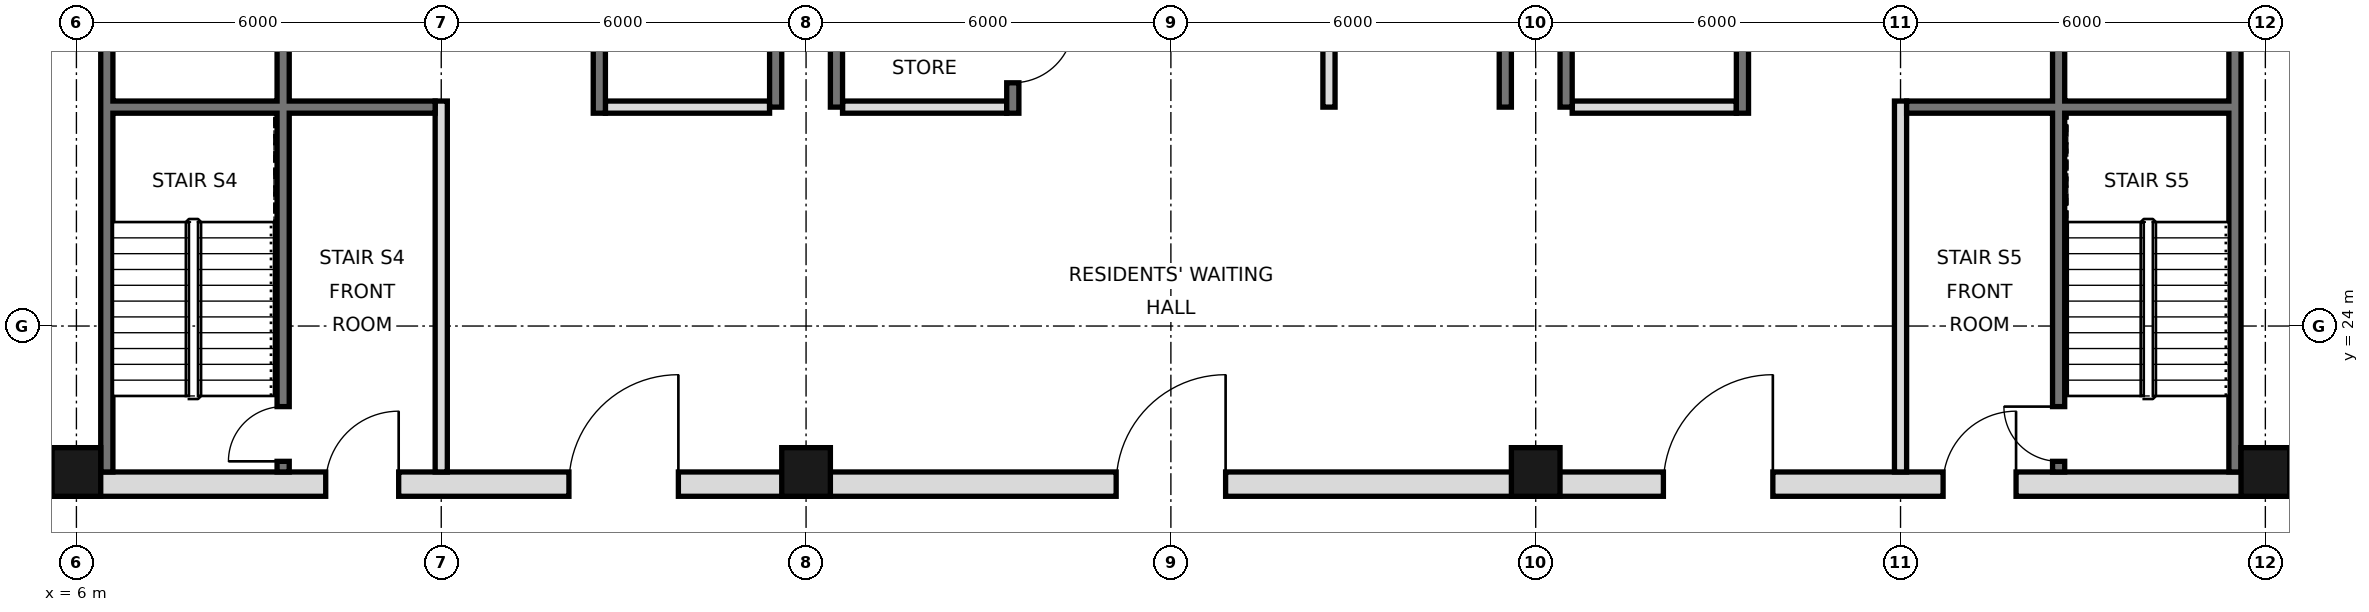
"""IFC4 building model, lengths in metres.
Left out: names, types, materials, properties, quantities, classifications, styles, units other than length and angle.
Written with IfcOpenShell. Run it as: python <this file> out.ifc"""

import sys

from ifc_helpers import new_model, si_unit, direction, frame, frame_2d, origin, origin_2d, place, context, subcontext, project, spatial, rectangle, hollow_rectangle, extrude, element, fill, save


model = new_model("IFC4")
c1 = context("Model", 3, precision=1e-05, world=origin(), true_north=direction((0.0, 1.0)))
c2 = subcontext(c1, "Body", "Model", "MODEL_VIEW")
j1 = project(units=[si_unit("LENGTHUNIT", "METRE"), si_unit("PLANEANGLEUNIT", "RADIAN")], contexts=[c1])
p1 = place(None, origin())
s1 = spatial("IfcSite", under=j1, at=p1, CompositionType="ELEMENT")
p2 = place(p1, origin())
s2 = spatial("IfcBuilding", under=s1, at=p2, CompositionType="ELEMENT")
p3 = place(p2, frame((0.0, 0.0, 337.8)))
s3 = spatial("IfcBuildingStorey", under=s2, at=p3, CompositionType="ELEMENT", Elevation=337.8)
for number, where, z_axis, x_axis in (
    (1, (6.0, 21.6, 0.0), (0.0, 0.0, 1.0), (1.0, 0.0, 0.0)),
    (2, (18.0, 21.6, 0.0), (0.0, 0.0, 1.0), (1.0, 0.0, 0.0)),
    (3, (30.0, 21.6, 0.0), (0.0, 0.0, 1.0), (1.0, 0.0, 0.0)),
    (4, (42.0, 21.6, 0.0), (0.0, 0.0, 1.0), (1.0, 0.0, 0.0)),
):
    element("IfcColumn", number, at=place(p3, frame(where, z_axis=z_axis, x_axis=x_axis)), inside=s3, PredefinedType="COLUMN", context=c2, shape_type="SweptSolid", body=[
        extrude(hollow_rectangle(XDim=0.8, YDim=0.8, WallThickness=0.025, at=origin_2d()), origin(), (0.0, 0.0, 1.0), 4.0),
    ])
for number, where, z_axis, x_axis in (
    (5, (6.5, 21.6, 0.0), (0.0, 0.0, 1.0), (0.0, 1.0, 0.0)),
    (6, (41.5, 21.6, 0.0), (0.0, 0.0, 1.0), (0.0, 1.0, 0.0)),
):
    element("IfcWall", number, at=place(p3, frame(where, z_axis=z_axis, x_axis=x_axis)), inside=s3, PredefinedType="SOLIDWALL", context=c2, shape_type="SweptSolid", body=[
        extrude(rectangle(XDim=23.5, YDim=0.2, at=frame_2d((11.75, 0.0))), origin(), (0.0, 0.0, 1.0), 3.75),
    ])
for number, where, z_axis, x_axis in (
    (7, (17.5, 27.6, 0.0), (0.0, 0.0, 1.0), (0.0, 1.0, 0.0)),
    (8, (18.5, 27.6, 0.0), (0.0, 0.0, 1.0), (0.0, 1.0, 0.0)),
    (9, (29.5, 27.6, 0.0), (0.0, 0.0, 1.0), (0.0, 1.0, 0.0)),
    (10, (30.5, 27.6, 0.0), (0.0, 0.0, 1.0), (0.0, 1.0, 0.0)),
):
    element("IfcWall", number, at=place(p3, frame(where, z_axis=z_axis, x_axis=x_axis)), inside=s3, PredefinedType="SOLIDWALL", context=c2, shape_type="SweptSolid", body=[
        extrude(rectangle(XDim=17.5, YDim=0.2, at=frame_2d((8.75, 0.0))), origin(), (0.0, 0.0, 1.0), 3.75),
    ])
p4 = place(p3, frame((5.6, 21.4, 0.0), z_axis=(0.0, 0.0, 1.0), x_axis=(1.0, 0.0, 0.0)))
e11 = element("IfcWall", 11, at=p4, inside=s3, PredefinedType="SOLIDWALL", context=c2, shape_type="SweptSolid", body=[
    extrude(rectangle(XDim=36.8, YDim=0.4, at=frame_2d((18.4, 0.0))), origin(), (0.0, 0.0, 1.0), 3.75),
])
p5 = place(p4, frame((8.5, 0.0, 0.0)))
e12 = element("IfcOpeningElement", 12, at=p5, cuts=e11, PredefinedType="OPENING", context=c2, shape_type="SweptSolid", body=[
    extrude(rectangle(XDim=1.8, YDim=2.1, at=frame_2d((0.9, 1.05))), frame((0.0, 0.21, 0.0), z_axis=(0.0, -1.0, 0.0), x_axis=(1.0, 0.0, 0.0)), (0.0, 0.0, 1.0), 0.42),
])
p6 = place(p4, frame((17.5, 0.0, 0.0)))
e13 = element("IfcOpeningElement", 13, at=p6, cuts=e11, PredefinedType="OPENING", context=c2, shape_type="SweptSolid", body=[
    extrude(rectangle(XDim=1.8, YDim=2.1, at=frame_2d((0.9, 1.05))), frame((0.0, 0.21, 0.0), z_axis=(0.0, -1.0, 0.0), x_axis=(1.0, 0.0, 0.0)), (0.0, 0.0, 1.0), 0.42),
])
p7 = place(p4, frame((26.5, 0.0, 0.0)))
e14 = element("IfcOpeningElement", 14, at=p7, cuts=e11, PredefinedType="OPENING", context=c2, shape_type="SweptSolid", body=[
    extrude(rectangle(XDim=1.8, YDim=2.1, at=frame_2d((0.9, 1.05))), frame((0.0, 0.21, 0.0), z_axis=(0.0, -1.0, 0.0), x_axis=(1.0, 0.0, 0.0)), (0.0, 0.0, 1.0), 0.42),
])
p8 = place(p4, frame((4.5, 0.0, 0.0)))
e15 = element("IfcOpeningElement", 15, at=p8, cuts=e11, PredefinedType="OPENING", context=c2, shape_type="SweptSolid", body=[
    extrude(rectangle(XDim=1.2, YDim=2.1, at=frame_2d((0.6, 1.05))), frame((0.0, 0.21, 0.0), z_axis=(0.0, -1.0, 0.0), x_axis=(1.0, 0.0, 0.0)), (0.0, 0.0, 1.0), 0.42),
])
p9 = place(p4, frame((31.1, 0.0, 0.0)))
e16 = element("IfcOpeningElement", 16, at=p9, cuts=e11, PredefinedType="OPENING", context=c2, shape_type="SweptSolid", body=[
    extrude(rectangle(XDim=1.2, YDim=2.1, at=frame_2d((0.6, 1.05))), frame((0.0, 0.21, 0.0), z_axis=(0.0, -1.0, 0.0), x_axis=(1.0, 0.0, 0.0)), (0.0, 0.0, 1.0), 0.42),
])
p10 = place(p3, frame((12.0, 21.6, 0.0), z_axis=(0.0, 0.0, 1.0), x_axis=(0.0, 1.0, 0.0)))
e17 = element("IfcWall", 17, at=p10, inside=s3, PredefinedType="PARTITIONING", context=c2, shape_type="SweptSolid", body=[
    extrude(rectangle(XDim=6.1, YDim=0.2, at=frame_2d((3.05, 0.0))), origin(), (0.0, 0.0, 1.0), 3.75),
])
p11 = place(p3, frame((14.6, 27.5, 0.0), z_axis=(0.0, 0.0, 1.0), x_axis=(0.0, 1.0, 0.0)))
e18 = element("IfcWall", 18, at=p11, inside=s3, PredefinedType="SOLIDWALL", context=c2, shape_type="SweptSolid", body=[
    extrude(rectangle(XDim=17.5, YDim=0.2, at=frame_2d((8.75, 0.0))), origin(), (0.0, 0.0, 1.0), 3.75),
])
p12 = place(p11, frame((15.4, 0.0, 0.0)))
e19 = element("IfcOpeningElement", 19, at=p12, cuts=e18, PredefinedType="OPENING", context=c2, shape_type="SweptSolid", body=[
    extrude(rectangle(XDim=1.1, YDim=2.1, at=frame_2d((0.55, 1.05))), frame((0.0, 0.11, 0.0), z_axis=(0.0, -1.0, 0.0), x_axis=(1.0, 0.0, 0.0)), (0.0, 0.0, 1.0), 0.22),
])
p13 = place(p11, frame((1.15, 0.0, 0.0)))
e20 = element("IfcOpeningElement", 20, at=p13, cuts=e18, PredefinedType="OPENING", context=c2, shape_type="SweptSolid", body=[
    extrude(rectangle(XDim=1.0, YDim=2.1, at=frame_2d((0.5, 1.05))), frame((0.0, 0.11, 0.0), z_axis=(0.0, -1.0, 0.0), x_axis=(1.0, 0.0, 0.0)), (0.0, 0.0, 1.0), 0.22),
])
p14 = place(p11, frame((4.25, 0.0, 0.0)))
e21 = element("IfcOpeningElement", 21, at=p14, cuts=e18, PredefinedType="OPENING", context=c2, shape_type="SweptSolid", body=[
    extrude(rectangle(XDim=1.0, YDim=2.1, at=frame_2d((0.5, 1.05))), frame((0.0, 0.11, 0.0), z_axis=(0.0, -1.0, 0.0), x_axis=(1.0, 0.0, 0.0)), (0.0, 0.0, 1.0), 0.22),
])
p15 = place(p3, frame((21.4, 27.5, 0.0), z_axis=(0.0, 0.0, 1.0), x_axis=(0.0, 1.0, 0.0)))
e22 = element("IfcWall", 22, at=p15, inside=s3, PredefinedType="SOLIDWALL", context=c2, shape_type="SweptSolid", body=[
    extrude(rectangle(XDim=17.5, YDim=0.2, at=frame_2d((8.75, 0.0))), origin(), (0.0, 0.0, 1.0), 3.75),
])
p16 = place(p15, frame((0.5, 0.0, 0.0)))
e23 = element("IfcOpeningElement", 23, at=p16, cuts=e22, PredefinedType="OPENING", context=c2, shape_type="SweptSolid", body=[
    extrude(rectangle(XDim=1.0, YDim=2.1, at=frame_2d((0.5, 1.05))), frame((0.0, 0.11, 0.0), z_axis=(0.0, -1.0, 0.0), x_axis=(1.0, 0.0, 0.0)), (0.0, 0.0, 1.0), 0.22),
])
p17 = place(p15, frame((3.6, 0.0, 0.0)))
e24 = element("IfcOpeningElement", 24, at=p17, cuts=e22, PredefinedType="OPENING", context=c2, shape_type="SweptSolid", body=[
    extrude(rectangle(XDim=1.0, YDim=2.1, at=frame_2d((0.5, 1.05))), frame((0.0, 0.11, 0.0), z_axis=(0.0, -1.0, 0.0), x_axis=(1.0, 0.0, 0.0)), (0.0, 0.0, 1.0), 0.22),
])
p18 = place(p15, frame((9.8, 0.0, 0.0)))
e25 = element("IfcOpeningElement", 25, at=p18, cuts=e22, PredefinedType="OPENING", context=c2, shape_type="SweptSolid", body=[
    extrude(rectangle(XDim=1.0, YDim=2.1, at=frame_2d((0.5, 1.05))), frame((0.0, 0.11, 0.0), z_axis=(0.0, -1.0, 0.0), x_axis=(1.0, 0.0, 0.0)), (0.0, 0.0, 1.0), 0.22),
])
p19 = place(p3, frame((26.6, 27.6, 0.0), z_axis=(0.0, 0.0, 1.0), x_axis=(0.0, 1.0, 0.0)))
e26 = element("IfcWall", 26, at=p19, inside=s3, PredefinedType="PARTITIONING", context=c2, shape_type="SweptSolid", body=[
    extrude(rectangle(XDim=17.4, YDim=0.2, at=frame_2d((8.7, 0.0))), origin(), (0.0, 0.0, 1.0), 3.75),
])
p20 = place(p19, frame((10.25, 0.0, 0.0)))
e27 = element("IfcOpeningElement", 27, at=p20, cuts=e26, PredefinedType="OPENING", context=c2, shape_type="SweptSolid", body=[
    extrude(rectangle(XDim=1.0, YDim=2.1, at=frame_2d((0.5, 1.05))), frame((0.0, 0.11, 0.0), z_axis=(0.0, -1.0, 0.0), x_axis=(1.0, 0.0, 0.0)), (0.0, 0.0, 1.0), 0.22),
])
p21 = place(p3, frame((33.4, 27.5, 0.0), z_axis=(0.0, 0.0, 1.0), x_axis=(0.0, 1.0, 0.0)))
e28 = element("IfcWall", 28, at=p21, inside=s3, PredefinedType="SOLIDWALL", context=c2, shape_type="SweptSolid", body=[
    extrude(rectangle(XDim=17.5, YDim=0.2, at=frame_2d((8.75, 0.0))), origin(), (0.0, 0.0, 1.0), 3.75),
])
p22 = place(p21, frame((15.4, 0.0, 0.0)))
e29 = element("IfcOpeningElement", 29, at=p22, cuts=e28, PredefinedType="OPENING", context=c2, shape_type="SweptSolid", body=[
    extrude(rectangle(XDim=1.1, YDim=2.1, at=frame_2d((0.55, 1.05))), frame((0.0, 0.11, 0.0), z_axis=(0.0, -1.0, 0.0), x_axis=(1.0, 0.0, 0.0)), (0.0, 0.0, 1.0), 0.22),
])
p23 = place(p21, frame((1.15, 0.0, 0.0)))
e30 = element("IfcOpeningElement", 30, at=p23, cuts=e28, PredefinedType="OPENING", context=c2, shape_type="SweptSolid", body=[
    extrude(rectangle(XDim=1.0, YDim=2.1, at=frame_2d((0.5, 1.05))), frame((0.0, 0.11, 0.0), z_axis=(0.0, -1.0, 0.0), x_axis=(1.0, 0.0, 0.0)), (0.0, 0.0, 1.0), 0.22),
])
p24 = place(p21, frame((4.25, 0.0, 0.0)))
e31 = element("IfcOpeningElement", 31, at=p24, cuts=e28, PredefinedType="OPENING", context=c2, shape_type="SweptSolid", body=[
    extrude(rectangle(XDim=1.0, YDim=2.1, at=frame_2d((0.5, 1.05))), frame((0.0, 0.11, 0.0), z_axis=(0.0, -1.0, 0.0), x_axis=(1.0, 0.0, 0.0)), (0.0, 0.0, 1.0), 0.22),
])
p25 = place(p3, frame((36.0, 21.6, 0.0), z_axis=(0.0, 0.0, 1.0), x_axis=(0.0, 1.0, 0.0)))
e32 = element("IfcWall", 32, at=p25, inside=s3, PredefinedType="PARTITIONING", context=c2, shape_type="SweptSolid", body=[
    extrude(rectangle(XDim=6.1, YDim=0.2, at=frame_2d((3.05, 0.0))), origin(), (0.0, 0.0, 1.0), 3.75),
])
p26 = place(p3, frame((38.6, 21.6, 0.0), z_axis=(0.0, 0.0, 1.0), x_axis=(0.0, 1.0, 0.0)))
e33 = element("IfcWall", 33, at=p26, inside=s3, PredefinedType="SOLIDWALL", context=c2, shape_type="SweptSolid", body=[
    extrude(rectangle(XDim=23.4, YDim=0.2, at=frame_2d((11.7, 0.0))), origin(), (0.0, 0.0, 1.0), 3.75),
])
p27 = place(p26, frame((7.05, 0.0, 0.0)))
e34 = element("IfcOpeningElement", 34, at=p27, cuts=e33, PredefinedType="OPENING", context=c2, shape_type="SweptSolid", body=[
    extrude(rectangle(XDim=1.0, YDim=2.1, at=frame_2d((0.5, 1.05))), frame((0.0, 0.11, 0.0), z_axis=(0.0, -1.0, 0.0), x_axis=(1.0, 0.0, 0.0)), (0.0, 0.0, 1.0), 0.22),
])
p28 = place(p26, frame((11.7, 0.0, 0.0)))
e35 = element("IfcOpeningElement", 35, at=p28, cuts=e33, PredefinedType="OPENING", context=c2, shape_type="SweptSolid", body=[
    extrude(rectangle(XDim=1.0, YDim=2.1, at=frame_2d((0.5, 1.05))), frame((0.0, 0.11, 0.0), z_axis=(0.0, -1.0, 0.0), x_axis=(1.0, 0.0, 0.0)), (0.0, 0.0, 1.0), 0.22),
])
p29 = place(p26, frame((15.7, 0.0, 0.0)))
e36 = element("IfcOpeningElement", 36, at=p29, cuts=e33, PredefinedType="OPENING", context=c2, shape_type="SweptSolid", body=[
    extrude(rectangle(XDim=1.0, YDim=2.1, at=frame_2d((0.5, 1.05))), frame((0.0, 0.11, 0.0), z_axis=(0.0, -1.0, 0.0), x_axis=(1.0, 0.0, 0.0)), (0.0, 0.0, 1.0), 0.22),
])
p30 = place(p26, frame((0.175, 0.0, 0.0)))
e37 = element("IfcOpeningElement", 37, at=p30, cuts=e33, PredefinedType="OPENING", context=c2, shape_type="SweptSolid", body=[
    extrude(rectangle(XDim=0.9, YDim=2.1, at=frame_2d((0.45, 1.05))), frame((0.0, 0.11, 0.0), z_axis=(0.0, -1.0, 0.0), x_axis=(1.0, 0.0, 0.0)), (0.0, 0.0, 1.0), 0.22),
])
p31 = place(p3, frame((9.4, 21.6, 0.0), z_axis=(0.0, 0.0, 1.0), x_axis=(0.0, 1.0, 0.0)))
e38 = element("IfcWall", 38, at=p31, inside=s3, PredefinedType="SOLIDWALL", context=c2, shape_type="SweptSolid", body=[
    extrude(rectangle(XDim=23.4, YDim=0.2, at=frame_2d((11.7, 0.0))), origin(), (0.0, 0.0, 1.0), 3.75),
])
p32 = place(p31, frame((7.7, 0.0, 0.0)))
e39 = element("IfcOpeningElement", 39, at=p32, cuts=e38, PredefinedType="OPENING", context=c2, shape_type="SweptSolid", body=[
    extrude(rectangle(XDim=1.0, YDim=2.1, at=frame_2d((0.5, 1.05))), frame((0.0, 0.11, 0.0), z_axis=(0.0, -1.0, 0.0), x_axis=(1.0, 0.0, 0.0)), (0.0, 0.0, 1.0), 0.22),
])
p33 = place(p31, frame((12.35, 0.0, 0.0)))
e40 = element("IfcOpeningElement", 40, at=p33, cuts=e38, PredefinedType="OPENING", context=c2, shape_type="SweptSolid", body=[
    extrude(rectangle(XDim=1.0, YDim=2.1, at=frame_2d((0.5, 1.05))), frame((0.0, 0.11, 0.0), z_axis=(0.0, -1.0, 0.0), x_axis=(1.0, 0.0, 0.0)), (0.0, 0.0, 1.0), 0.22),
])
p34 = place(p31, frame((15.7, 0.0, 0.0)))
e41 = element("IfcOpeningElement", 41, at=p34, cuts=e38, PredefinedType="OPENING", context=c2, shape_type="SweptSolid", body=[
    extrude(rectangle(XDim=1.0, YDim=2.1, at=frame_2d((0.5, 1.05))), frame((0.0, 0.11, 0.0), z_axis=(0.0, -1.0, 0.0), x_axis=(1.0, 0.0, 0.0)), (0.0, 0.0, 1.0), 0.22),
])
p35 = place(p31, frame((0.175, 0.0, 0.0)))
e42 = element("IfcOpeningElement", 42, at=p35, cuts=e38, PredefinedType="OPENING", context=c2, shape_type="SweptSolid", body=[
    extrude(rectangle(XDim=0.9, YDim=2.1, at=frame_2d((0.45, 1.05))), frame((0.0, 0.11, 0.0), z_axis=(0.0, -1.0, 0.0), x_axis=(1.0, 0.0, 0.0)), (0.0, 0.0, 1.0), 0.22),
])
for number, where, z_axis, x_axis in (
    (43, (14.7, 27.6, 0.0), (0.0, 0.0, 1.0), (1.0, 0.0, 0.0)),
    (44, (18.6, 27.6, 0.0), (0.0, 0.0, 1.0), (1.0, 0.0, 0.0)),
    (45, (30.6, 27.6, 0.0), (0.0, 0.0, 1.0), (1.0, 0.0, 0.0)),
):
    element("IfcWall", number, at=place(p3, frame(where, z_axis=z_axis, x_axis=x_axis)), inside=s3, PredefinedType="PARTITIONING", context=c2, shape_type="SweptSolid", body=[
        extrude(rectangle(XDim=2.7, YDim=0.2, at=frame_2d((1.35, 0.0))), origin(), (0.0, 0.0, 1.0), 3.75),
    ])
for number, where, z_axis, x_axis in (
    (46, (36.1, 27.6, 0.0), (0.0, 0.0, 1.0), (1.0, 0.0, 0.0)),
    (47, (6.6, 27.6, 0.0), (0.0, 0.0, 1.0), (1.0, 0.0, 0.0)),
):
    element("IfcWall", number, at=place(p3, frame(where, z_axis=z_axis, x_axis=x_axis)), inside=s3, PredefinedType="SOLIDWALL", context=c2, shape_type="SweptSolid", body=[
        extrude(rectangle(XDim=5.3, YDim=0.2, at=frame_2d((2.65, 0.0))), origin(), (0.0, 0.0, 1.0), 3.75),
    ])
p36 = place(p5, frame((1.8, 0.0, 0.0), z_axis=(0.0, 0.0, 1.0), x_axis=(-1.0, 0.0, 0.0)))
e48 = element("IfcDoor", 48, at=p36, inside=s3, OperationType="SINGLE_SWING_LEFT", PredefinedType="DOOR", context=c2, shape_type="SweptSolid", body=[
    extrude(rectangle(XDim=1.8, YDim=2.1, at=frame_2d((0.9, 1.05))), frame((0.0, 0.025, 0.0), z_axis=(0.0, -1.0, 0.0), x_axis=(1.0, 0.0, 0.0)), (0.0, 0.0, 1.0), 0.05),
])
fill(e12, e48)
p37 = place(p6, frame((1.8, 0.0, 0.0), z_axis=(0.0, 0.0, 1.0), x_axis=(-1.0, 0.0, 0.0)))
e49 = element("IfcDoor", 49, at=p37, inside=s3, OperationType="SINGLE_SWING_LEFT", PredefinedType="DOOR", context=c2, shape_type="SweptSolid", body=[
    extrude(rectangle(XDim=1.8, YDim=2.1, at=frame_2d((0.9, 1.05))), frame((0.0, 0.025, 0.0), z_axis=(0.0, -1.0, 0.0), x_axis=(1.0, 0.0, 0.0)), (0.0, 0.0, 1.0), 0.05),
])
fill(e13, e49)
p38 = place(p7, frame((1.8, 0.0, 0.0), z_axis=(0.0, 0.0, 1.0), x_axis=(-1.0, 0.0, 0.0)))
e50 = element("IfcDoor", 50, at=p38, inside=s3, OperationType="SINGLE_SWING_LEFT", PredefinedType="DOOR", context=c2, shape_type="SweptSolid", body=[
    extrude(rectangle(XDim=1.8, YDim=2.1, at=frame_2d((0.9, 1.05))), frame((0.0, 0.025, 0.0), z_axis=(0.0, -1.0, 0.0), x_axis=(1.0, 0.0, 0.0)), (0.0, 0.0, 1.0), 0.05),
])
fill(e14, e50)
p39 = place(p8, frame((1.2, 0.0, 0.0), z_axis=(0.0, 0.0, 1.0), x_axis=(-1.0, 0.0, 0.0)))
e51 = element("IfcDoor", 51, at=p39, inside=s3, OperationType="SINGLE_SWING_LEFT", PredefinedType="DOOR", context=c2, shape_type="SweptSolid", body=[
    extrude(rectangle(XDim=1.2, YDim=2.1, at=frame_2d((0.6, 1.05))), frame((0.0, 0.025, 0.0), z_axis=(0.0, -1.0, 0.0), x_axis=(1.0, 0.0, 0.0)), (0.0, 0.0, 1.0), 0.05),
])
fill(e15, e51)
p40 = place(p9, frame((1.2, 0.0, 0.0), z_axis=(0.0, 0.0, 1.0), x_axis=(-1.0, 0.0, 0.0)))
e52 = element("IfcDoor", 52, at=p40, inside=s3, OperationType="SINGLE_SWING_LEFT", PredefinedType="DOOR", context=c2, shape_type="SweptSolid", body=[
    extrude(rectangle(XDim=1.2, YDim=2.1, at=frame_2d((0.6, 1.05))), frame((0.0, 0.025, 0.0), z_axis=(0.0, -1.0, 0.0), x_axis=(1.0, 0.0, 0.0)), (0.0, 0.0, 1.0), 0.05),
])
fill(e16, e52)
p41 = place(p16, origin())
e53 = element("IfcDoor", 53, at=p41, inside=s3, OperationType="SINGLE_SWING_RIGHT", PredefinedType="DOOR", context=c2, shape_type="SweptSolid", body=[
    extrude(rectangle(XDim=1.0, YDim=2.1, at=frame_2d((0.5, 1.05))), frame((0.0, 0.025, 0.0), z_axis=(0.0, -1.0, 0.0), x_axis=(1.0, 0.0, 0.0)), (0.0, 0.0, 1.0), 0.05),
])
fill(e23, e53)
p42 = place(p35, origin())
e54 = element("IfcDoor", 54, at=p42, inside=s3, OperationType="SINGLE_SWING_LEFT", PredefinedType="DOOR", context=c2, shape_type="SweptSolid", body=[
    extrude(rectangle(XDim=0.9, YDim=2.1, at=frame_2d((0.45, 1.05))), frame((0.0, 0.025, 0.0), z_axis=(0.0, -1.0, 0.0), x_axis=(1.0, 0.0, 0.0)), (0.0, 0.0, 1.0), 0.05),
])
fill(e42, e54)
p43 = place(p30, frame((0.9, 0.0, 0.0), z_axis=(0.0, 0.0, 1.0), x_axis=(-1.0, 0.0, 0.0)))
e55 = element("IfcDoor", 55, at=p43, inside=s3, OperationType="SINGLE_SWING_LEFT", PredefinedType="DOOR", context=c2, shape_type="SweptSolid", body=[
    extrude(rectangle(XDim=0.9, YDim=2.1, at=frame_2d((0.45, 1.05))), frame((0.0, 0.025, 0.0), z_axis=(0.0, -1.0, 0.0), x_axis=(1.0, 0.0, 0.0)), (0.0, 0.0, 1.0), 0.05),
])
fill(e37, e55)
save(model, sys.argv[1])
